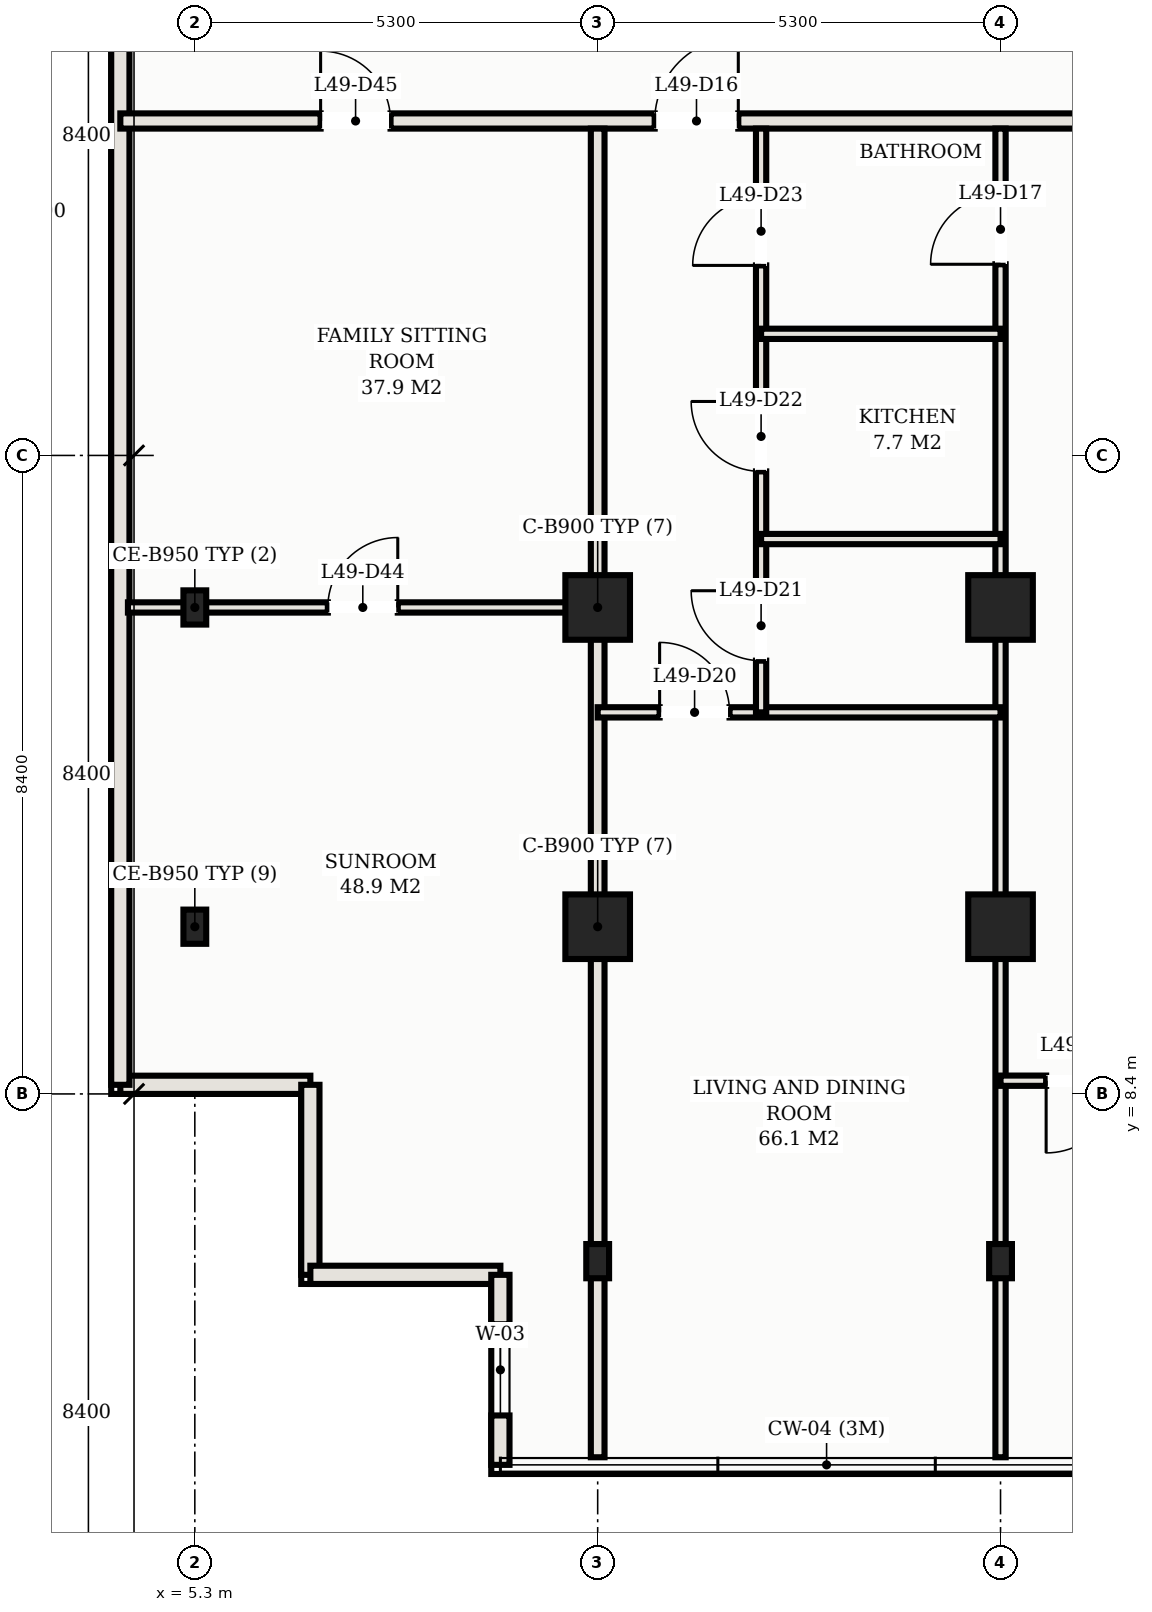
"""IFC4 building model, lengths in metres.
Left out: names, types, materials, properties, quantities, classifications, styles, units other than length and angle.
Written with IfcOpenShell. Run it as: python <this file> out.ifc"""

import sys

from ifc_helpers import new_model, si_unit, direction, frame, frame_2d, origin, origin_2d, place, context, subcontext, project, spatial, rectangle, hollow_rectangle, extrude, element, fill, save


model = new_model("IFC4")
c1 = context("Model", 3, precision=1e-05, world=origin(), true_north=direction((0.0, 1.0)))
c2 = subcontext(c1, "Body", "Model", "MODEL_VIEW")
j1 = project(units=[si_unit("LENGTHUNIT", "METRE"), si_unit("PLANEANGLEUNIT", "RADIAN")], contexts=[c1])
p1 = place(None, origin())
s1 = spatial("IfcSite", under=j1, at=p1, CompositionType="ELEMENT")
p2 = place(p1, origin())
s2 = spatial("IfcBuilding", under=s1, at=p2, CompositionType="ELEMENT")
p3 = place(p2, frame((0.0, 0.0, 178.8)))
s3 = spatial("IfcBuildingStorey", under=s2, at=p3, CompositionType="ELEMENT", Elevation=178.8)
for number, where, z_axis, x_axis in (
    (1, (10.6, 14.8, 0.0), (0.0, 0.0, 1.0), (1.0, 0.0, 0.0)),
    (2, (10.6, 10.6, 0.0), (0.0, 0.0, 1.0), (1.0, 0.0, 0.0)),
    (3, (15.9, 14.8, 0.0), (0.0, 0.0, 1.0), (1.0, 0.0, 0.0)),
    (4, (15.9, 10.6, 0.0), (0.0, 0.0, 1.0), (1.0, 0.0, 0.0)),
):
    element("IfcColumn", number, at=place(p3, frame(where, z_axis=z_axis, x_axis=x_axis)), inside=s3, PredefinedType="COLUMN", context=c2, shape_type="SweptSolid", body=[
        extrude(hollow_rectangle(XDim=0.85, YDim=0.85, WallThickness=0.028, at=origin_2d()), origin(), (0.0, 0.0, 1.0), 3.3),
    ])
for number, where, z_axis, x_axis in (
    (5, (10.6, 6.2, 0.0), (0.0, 0.0, 1.0), (1.0, 0.0, 0.0)),
    (6, (15.9, 6.2, 0.0), (0.0, 0.0, 1.0), (1.0, 0.0, 0.0)),
    (7, (5.3, 10.6, 0.0), (0.0, 0.0, 1.0), (1.0, 0.0, 0.0)),
    (8, (5.3, 14.8, 0.0), (0.0, 0.0, 1.0), (1.0, 0.0, 0.0)),
):
    element("IfcColumn", number, at=place(p3, frame(where, z_axis=z_axis, x_axis=x_axis)), inside=s3, PredefinedType="COLUMN", context=c2, shape_type="SweptSolid", body=[
        extrude(hollow_rectangle(XDim=0.3, YDim=0.45, WallThickness=0.016, at=origin_2d()), origin(), (0.0, 0.0, 1.0), 3.3),
    ])
for number, where, z_axis, x_axis in (
    (9, (4.32, 8.52, 0.0), (0.0, 0.0, 1.0), (1.0, 0.0, 0.0)),
    (10, (6.82, 8.52, 0.0), (0.0, 0.0, 1.0), (0.0, -1.0, 0.0)),
    (11, (6.82, 6.02, 0.0), (0.0, 0.0, 1.0), (1.0, 0.0, 0.0)),
):
    element("IfcWall", number, at=place(p3, frame(where, z_axis=z_axis, x_axis=x_axis)), inside=s3, PredefinedType="SOLIDWALL", context=c2, shape_type="SweptSolid", body=[
        extrude(rectangle(XDim=2.5, YDim=0.24, at=frame_2d((1.25, 0.0))), origin(), (0.0, 0.0, 1.0), 3.1),
    ])
p4 = place(p3, frame((9.32, 6.02, 0.0), z_axis=(0.0, 0.0, 1.0), x_axis=(0.0, -1.0, 0.0)))
e12 = element("IfcWall", 12, at=p4, inside=s3, PredefinedType="SOLIDWALL", context=c2, shape_type="SweptSolid", body=[
    extrude(rectangle(XDim=2.5, YDim=0.24, at=frame_2d((1.25, 0.0))), origin(), (0.0, 0.0, 1.0), 3.1),
])
p5 = place(p4, frame((0.65, 0.0, 0.75)))
e13 = element("IfcOpeningElement", 13, at=p5, cuts=e12, PredefinedType="OPENING", context=c2, shape_type="SweptSolid", body=[
    extrude(rectangle(XDim=1.2, YDim=1.5, at=frame_2d((0.6, 0.75))), frame((0.0, 0.13, 0.0), z_axis=(0.0, -1.0, 0.0), x_axis=(1.0, 0.0, 0.0)), (0.0, 0.0, 1.0), 0.26),
])
p6 = place(p3, frame((4.32, 35.93, 0.0), z_axis=(0.0, 0.0, 1.0), x_axis=(0.0, -1.0, 0.0)))
e14 = element("IfcWall", 14, at=p6, inside=s3, PredefinedType="SOLIDWALL", context=c2, shape_type="SweptSolid", body=[
    extrude(rectangle(XDim=27.41, YDim=0.24, at=frame_2d((13.705, 0.0))), origin(), (0.0, 0.0, 1.0), 3.1),
])
p7 = place(p3, frame((4.32, 21.2, 0.0), z_axis=(0.0, 0.0, 1.0), x_axis=(1.0, 0.0, 0.0)))
e15 = element("IfcWall", 15, at=p7, inside=s3, PredefinedType="PARTITIONING", context=c2, shape_type="SweptSolid", body=[
    extrude(rectangle(XDim=44.36, YDim=0.2, at=frame_2d((22.18, 0.0))), origin(), (0.0, 0.0, 1.0), 2.38),
])
p8 = place(p7, frame((7.03, 0.0, 0.0)))
e16 = element("IfcOpeningElement", 16, at=p8, cuts=e15, PredefinedType="OPENING", context=c2, shape_type="SweptSolid", body=[
    extrude(rectangle(XDim=1.1, YDim=2.25, at=frame_2d((0.55, 1.125))), frame((0.0, 0.11, 0.0), z_axis=(0.0, -1.0, 0.0), x_axis=(1.0, 0.0, 0.0)), (0.0, 0.0, 1.0), 0.22),
])
p9 = place(p7, frame((28.23, 0.0, 0.0)))
e17 = element("IfcOpeningElement", 17, at=p9, cuts=e15, PredefinedType="OPENING", context=c2, shape_type="SweptSolid", body=[
    extrude(rectangle(XDim=1.1, YDim=2.25, at=frame_2d((0.55, 1.125))), frame((0.0, 0.11, 0.0), z_axis=(0.0, -1.0, 0.0), x_axis=(1.0, 0.0, 0.0)), (0.0, 0.0, 1.0), 0.22),
])
p10 = place(p7, frame((2.635, 0.0, 0.0)))
e18 = element("IfcOpeningElement", 18, at=p10, cuts=e15, PredefinedType="OPENING", context=c2, shape_type="SweptSolid", body=[
    extrude(rectangle(XDim=0.92, YDim=2.15, at=frame_2d((0.46, 1.075))), frame((0.0, 0.11, 0.0), z_axis=(0.0, -1.0, 0.0), x_axis=(1.0, 0.0, 0.0)), (0.0, 0.0, 1.0), 0.22),
])
p11 = place(p7, frame((40.805, 0.0, 0.0)))
e19 = element("IfcOpeningElement", 19, at=p11, cuts=e15, PredefinedType="OPENING", context=c2, shape_type="SweptSolid", body=[
    extrude(rectangle(XDim=0.92, YDim=2.15, at=frame_2d((0.46, 1.075))), frame((0.0, 0.11, 0.0), z_axis=(0.0, -1.0, 0.0), x_axis=(1.0, 0.0, 0.0)), (0.0, 0.0, 1.0), 0.22),
])
p12 = place(p3, frame((10.6, 3.62, 0.0), z_axis=(0.0, 0.0, 1.0), x_axis=(0.0, 1.0, 0.0)))
e20 = element("IfcWall", 20, at=p12, inside=s3, PredefinedType="PARTITIONING", context=c2, shape_type="SweptSolid", body=[
    extrude(rectangle(XDim=17.48, YDim=0.18, at=frame_2d((8.74, 0.0))), origin(), (0.0, 0.0, 1.0), 2.38),
])
p13 = place(p3, frame((15.9, 3.62, 0.0), z_axis=(0.0, 0.0, 1.0), x_axis=(0.0, 1.0, 0.0)))
e21 = element("IfcWall", 21, at=p13, inside=s3, PredefinedType="PARTITIONING", context=c2, shape_type="SweptSolid", body=[
    extrude(rectangle(XDim=17.48, YDim=0.135, at=frame_2d((8.74, 0.0))), origin(), (0.0, 0.0, 1.0), 2.38),
])
p14 = place(p13, frame((15.695, 0.0, 0.0)))
e22 = element("IfcOpeningElement", 22, at=p14, cuts=e21, PredefinedType="OPENING", context=c2, shape_type="SweptSolid", body=[
    extrude(rectangle(XDim=0.92, YDim=2.15, at=frame_2d((0.46, 1.075))), frame((0.0, 0.078, 0.0), z_axis=(0.0, -1.0, 0.0), x_axis=(1.0, 0.0, 0.0)), (0.0, 0.0, 1.0), 0.155),
])
p15 = place(p3, frame((10.6, 13.42, 0.0), z_axis=(0.0, 0.0, 1.0), x_axis=(1.0, 0.0, 0.0)))
e23 = element("IfcWall", 23, at=p15, inside=s3, PredefinedType="PARTITIONING", context=c2, shape_type="SweptSolid", body=[
    extrude(rectangle(XDim=5.3, YDim=0.135, at=frame_2d((2.65, 0.0))), origin(), (0.0, 0.0, 1.0), 2.38),
])
p16 = place(p15, frame((0.815, 0.0, 0.0)))
e24 = element("IfcOpeningElement", 24, at=p16, cuts=e23, PredefinedType="OPENING", context=c2, shape_type="SweptSolid", body=[
    extrude(rectangle(XDim=0.92, YDim=2.15, at=frame_2d((0.46, 1.075))), frame((0.0, 0.078, 0.0), z_axis=(0.0, -1.0, 0.0), x_axis=(1.0, 0.0, 0.0)), (0.0, 0.0, 1.0), 0.155),
])
p17 = place(p3, frame((12.75, 13.42, 0.0), z_axis=(0.0, 0.0, 1.0), x_axis=(0.0, 1.0, 0.0)))
e25 = element("IfcWall", 25, at=p17, inside=s3, PredefinedType="PARTITIONING", context=c2, shape_type="SweptSolid", body=[
    extrude(rectangle(XDim=7.68, YDim=0.135, at=frame_2d((3.84, 0.0))), origin(), (0.0, 0.0, 1.0), 2.38),
])
p18 = place(p17, frame((0.68, 0.0, 0.0)))
e26 = element("IfcOpeningElement", 26, at=p18, cuts=e25, PredefinedType="OPENING", context=c2, shape_type="SweptSolid", body=[
    extrude(rectangle(XDim=0.92, YDim=2.15, at=frame_2d((0.46, 1.075))), frame((0.0, 0.078, 0.0), z_axis=(0.0, -1.0, 0.0), x_axis=(1.0, 0.0, 0.0)), (0.0, 0.0, 1.0), 0.155),
])
p19 = place(p17, frame((3.17, 0.0, 0.0)))
e27 = element("IfcOpeningElement", 27, at=p19, cuts=e25, PredefinedType="OPENING", context=c2, shape_type="SweptSolid", body=[
    extrude(rectangle(XDim=0.92, YDim=2.15, at=frame_2d((0.46, 1.075))), frame((0.0, 0.078, 0.0), z_axis=(0.0, -1.0, 0.0), x_axis=(1.0, 0.0, 0.0)), (0.0, 0.0, 1.0), 0.155),
])
p20 = place(p17, frame((5.88, 0.0, 0.0)))
e28 = element("IfcOpeningElement", 28, at=p20, cuts=e25, PredefinedType="OPENING", context=c2, shape_type="SweptSolid", body=[
    extrude(rectangle(XDim=0.9, YDim=2.15, at=frame_2d((0.45, 1.075))), frame((0.0, 0.078, 0.0), z_axis=(0.0, -1.0, 0.0), x_axis=(1.0, 0.0, 0.0)), (0.0, 0.0, 1.0), 0.155),
])
for number, where, z_axis, x_axis in (
    (29, (12.75, 15.7, 0.0), (0.0, 0.0, 1.0), (1.0, 0.0, 0.0)),
    (30, (12.75, 18.4, 0.0), (0.0, 0.0, 1.0), (1.0, 0.0, 0.0)),
):
    element("IfcWall", number, at=place(p3, frame(where, z_axis=z_axis, x_axis=x_axis)), inside=s3, PredefinedType="PARTITIONING", context=c2, shape_type="SweptSolid", body=[
        extrude(rectangle(XDim=3.15, YDim=0.135, at=frame_2d((1.575, 0.0))), origin(), (0.0, 0.0, 1.0), 2.38),
    ])
p21 = place(p3, frame((15.9, 8.574, 0.0), z_axis=(0.0, 0.0, 1.0), x_axis=(1.0, 0.0, 0.0)))
e31 = element("IfcWall", 31, at=p21, inside=s3, PredefinedType="PARTITIONING", context=c2, shape_type="SweptSolid", body=[
    extrude(rectangle(XDim=5.3, YDim=0.135, at=frame_2d((2.65, 0.0))), origin(), (0.0, 0.0, 1.0), 2.38),
])
p22 = place(p21, frame((0.6, 0.0, 0.0)))
e32 = element("IfcOpeningElement", 32, at=p22, cuts=e31, PredefinedType="OPENING", context=c2, shape_type="SweptSolid", body=[
    extrude(rectangle(XDim=0.95, YDim=2.15, at=frame_2d((0.475, 1.075))), frame((0.0, 0.078, 0.0), z_axis=(0.0, -1.0, 0.0), x_axis=(1.0, 0.0, 0.0)), (0.0, 0.0, 1.0), 0.155),
])
p23 = place(p21, frame((3.275, 0.0, 0.0)))
e33 = element("IfcOpeningElement", 33, at=p23, cuts=e31, PredefinedType="OPENING", context=c2, shape_type="SweptSolid", body=[
    extrude(rectangle(XDim=0.9, YDim=2.15, at=frame_2d((0.45, 1.075))), frame((0.0, 0.078, 0.0), z_axis=(0.0, -1.0, 0.0), x_axis=(1.0, 0.0, 0.0)), (0.0, 0.0, 1.0), 0.155),
])
p24 = place(p3, frame((4.42, 14.8, 0.0), z_axis=(0.0, 0.0, 1.0), x_axis=(1.0, 0.0, 0.0)))
e34 = element("IfcWall", 34, at=p24, inside=s3, PredefinedType="PARTITIONING", context=c2, shape_type="SweptSolid", body=[
    extrude(rectangle(XDim=6.18, YDim=0.135, at=frame_2d((3.09, 0.0))), origin(), (0.0, 0.0, 1.0), 2.38),
])
p25 = place(p24, frame((2.63, 0.0, 0.0)))
e35 = element("IfcOpeningElement", 35, at=p25, cuts=e34, PredefinedType="OPENING", context=c2, shape_type="SweptSolid", body=[
    extrude(rectangle(XDim=0.92, YDim=2.15, at=frame_2d((0.46, 1.075))), frame((0.0, 0.078, 0.0), z_axis=(0.0, -1.0, 0.0), x_axis=(1.0, 0.0, 0.0)), (0.0, 0.0, 1.0), 0.155),
])
p26 = place(p5, origin())
e36 = element("IfcWindow", 36, at=p26, inside=s3, PartitioningType="SINGLE_PANEL", PredefinedType="WINDOW", context=c2, shape_type="SweptSolid", body=[
    extrude(rectangle(XDim=1.2, YDim=1.5, at=frame_2d((0.6, 0.75))), frame((0.0, 0.03, 0.0), z_axis=(0.0, -1.0, 0.0), x_axis=(1.0, 0.0, 0.0)), (0.0, 0.0, 1.0), 0.06),
])
fill(e13, e36)
p27 = place(p8, origin())
e37 = element("IfcDoor", 37, at=p27, inside=s3, OperationType="SINGLE_SWING_RIGHT", PredefinedType="DOOR", context=c2, shape_type="SweptSolid", body=[
    extrude(rectangle(XDim=1.1, YDim=2.25, at=frame_2d((0.55, 1.125))), frame((0.0, 0.025, 0.0), z_axis=(0.0, -1.0, 0.0), x_axis=(1.0, 0.0, 0.0)), (0.0, 0.0, 1.0), 0.05),
])
fill(e16, e37)
p28 = place(p14, origin())
e38 = element("IfcDoor", 38, at=p28, inside=s3, OperationType="SINGLE_SWING_LEFT", PredefinedType="DOOR", context=c2, shape_type="SweptSolid", body=[
    extrude(rectangle(XDim=0.92, YDim=2.15, at=frame_2d((0.46, 1.075))), frame((0.0, 0.025, 0.0), z_axis=(0.0, -1.0, 0.0), x_axis=(1.0, 0.0, 0.0)), (0.0, 0.0, 1.0), 0.05),
])
fill(e22, e38)
p29 = place(p16, origin())
e39 = element("IfcDoor", 39, at=p29, inside=s3, OperationType="SINGLE_SWING_LEFT", PredefinedType="DOOR", context=c2, shape_type="SweptSolid", body=[
    extrude(rectangle(XDim=0.92, YDim=2.15, at=frame_2d((0.46, 1.075))), frame((0.0, 0.025, 0.0), z_axis=(0.0, -1.0, 0.0), x_axis=(1.0, 0.0, 0.0)), (0.0, 0.0, 1.0), 0.05),
])
fill(e24, e39)
p30 = place(p18, origin())
e40 = element("IfcDoor", 40, at=p30, inside=s3, OperationType="SINGLE_SWING_RIGHT", PredefinedType="DOOR", context=c2, shape_type="SweptSolid", body=[
    extrude(rectangle(XDim=0.92, YDim=2.15, at=frame_2d((0.46, 1.075))), frame((0.0, 0.025, 0.0), z_axis=(0.0, -1.0, 0.0), x_axis=(1.0, 0.0, 0.0)), (0.0, 0.0, 1.0), 0.05),
])
fill(e26, e40)
p31 = place(p19, origin())
e41 = element("IfcDoor", 41, at=p31, inside=s3, OperationType="SINGLE_SWING_RIGHT", PredefinedType="DOOR", context=c2, shape_type="SweptSolid", body=[
    extrude(rectangle(XDim=0.92, YDim=2.15, at=frame_2d((0.46, 1.075))), frame((0.0, 0.025, 0.0), z_axis=(0.0, -1.0, 0.0), x_axis=(1.0, 0.0, 0.0)), (0.0, 0.0, 1.0), 0.05),
])
fill(e27, e41)
p32 = place(p20, origin())
e42 = element("IfcDoor", 42, at=p32, inside=s3, OperationType="SINGLE_SWING_LEFT", PredefinedType="DOOR", context=c2, shape_type="SweptSolid", body=[
    extrude(rectangle(XDim=0.9, YDim=2.15, at=frame_2d((0.45, 1.075))), frame((0.0, 0.025, 0.0), z_axis=(0.0, -1.0, 0.0), x_axis=(1.0, 0.0, 0.0)), (0.0, 0.0, 1.0), 0.05),
])
fill(e28, e42)
p33 = place(p22, frame((0.95, 0.0, 0.0), z_axis=(0.0, 0.0, 1.0), x_axis=(-1.0, 0.0, 0.0)))
e43 = element("IfcDoor", 43, at=p33, inside=s3, OperationType="SINGLE_SWING_RIGHT", PredefinedType="DOOR", context=c2, shape_type="SweptSolid", body=[
    extrude(rectangle(XDim=0.95, YDim=2.15, at=frame_2d((0.475, 1.075))), frame((0.0, 0.025, 0.0), z_axis=(0.0, -1.0, 0.0), x_axis=(1.0, 0.0, 0.0)), (0.0, 0.0, 1.0), 0.05),
])
fill(e32, e43)
p34 = place(p25, origin())
e44 = element("IfcDoor", 44, at=p34, inside=s3, OperationType="SINGLE_SWING_RIGHT", PredefinedType="DOOR", context=c2, shape_type="SweptSolid", body=[
    extrude(rectangle(XDim=0.92, YDim=2.15, at=frame_2d((0.46, 1.075))), frame((0.0, 0.025, 0.0), z_axis=(0.0, -1.0, 0.0), x_axis=(1.0, 0.0, 0.0)), (0.0, 0.0, 1.0), 0.05),
])
fill(e35, e44)
p35 = place(p10, origin())
e45 = element("IfcDoor", 45, at=p35, inside=s3, OperationType="SINGLE_SWING_LEFT", PredefinedType="DOOR", context=c2, shape_type="SweptSolid", body=[
    extrude(rectangle(XDim=0.92, YDim=2.15, at=frame_2d((0.46, 1.075))), frame((0.0, 0.025, 0.0), z_axis=(0.0, -1.0, 0.0), x_axis=(1.0, 0.0, 0.0)), (0.0, 0.0, 1.0), 0.05),
])
fill(e18, e45)
save(model, sys.argv[1])
